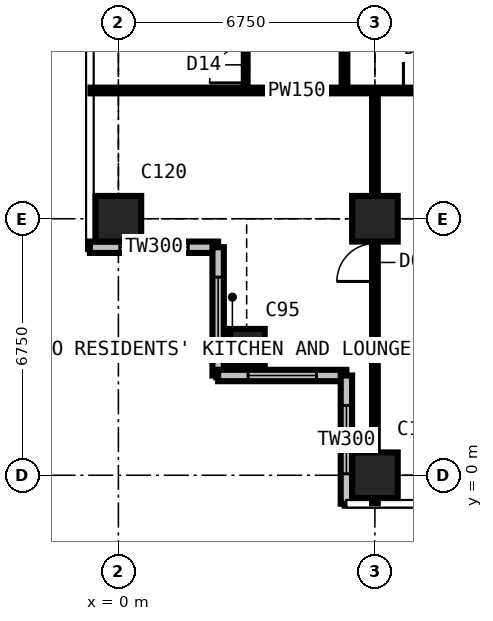
"""IFC4 building model, lengths in metres.
Left out: names, types, materials, properties, quantities, classifications, styles, units other than length and angle.
Written with IfcOpenShell. Run it as: python <this file> out.ifc"""

import sys

from ifc_helpers import new_model, si_unit, direction, frame, frame_2d, origin, origin_2d, place, context, subcontext, project, spatial, rectangle, extrude, element, fill, save


model = new_model("IFC4")
c1 = context("Model", 3, precision=1e-05, world=origin(), true_north=direction((0.0, 1.0)))
c2 = subcontext(c1, "Body", "Model", "MODEL_VIEW")
j1 = project(units=[si_unit("LENGTHUNIT", "METRE"), si_unit("PLANEANGLEUNIT", "RADIAN")], contexts=[c1])
p1 = place(None, origin())
s1 = spatial("IfcSite", under=j1, at=p1, CompositionType="ELEMENT")
p2 = place(p1, origin())
s2 = spatial("IfcBuilding", under=s1, at=p2, CompositionType="ELEMENT")
p3 = place(p2, frame((0.0, 0.0, 181.8)))
s3 = spatial("IfcBuildingStorey", under=s2, at=p3, CompositionType="ELEMENT", Elevation=181.8)
p4 = place(p3, frame((0.0, 6.75, 0.0), z_axis=(0.0, 0.0, 1.0), x_axis=(1.0, 0.0, 0.0)))
e1 = element("IfcColumn", 1, at=p4, inside=s3, PredefinedType="COLUMN", context=c2, shape_type="SweptSolid", body=[
    extrude(rectangle(XDim=1.2, YDim=1.2, at=origin_2d()), origin(), (0.0, 0.0, 1.0), 3.6),
])
p5 = place(p3, frame((3.375, 3.375, 0.0), z_axis=(0.0, 0.0, 1.0), x_axis=(1.0, 0.0, 0.0)))
e2 = element("IfcColumn", 2, at=p5, inside=s3, PredefinedType="COLUMN", context=c2, shape_type="SweptSolid", body=[
    extrude(rectangle(XDim=0.95, YDim=0.95, at=origin_2d()), origin(), (0.0, 0.0, 1.0), 3.6),
])
for number, where, z_axis, x_axis in (
    (3, (6.75, 0.0, 0.0), (0.0, 0.0, 1.0), (1.0, 0.0, 0.0)),
    (4, (6.75, 6.75, 0.0), (0.0, 0.0, 1.0), (1.0, 0.0, 0.0)),
):
    element("IfcColumn", number, at=place(p3, frame(where, z_axis=z_axis, x_axis=x_axis)), inside=s3, PredefinedType="COLUMN", context=c2, shape_type="SweptSolid", body=[
        extrude(rectangle(XDim=1.2, YDim=1.2, at=origin_2d()), origin(), (0.0, 0.0, 1.0), 3.6),
    ])
p6 = place(p3, frame((-0.75, 6.0, 0.0), z_axis=(0.0, 0.0, 1.0), x_axis=(1.0, 0.0, 0.0)))
e5 = element("IfcWall", 5, at=p6, inside=s3, PredefinedType="SOLIDWALL", context=c2, shape_type="SweptSolid", body=[
    extrude(rectangle(XDim=3.375, YDim=0.3, at=frame_2d((1.688, 0.0))), origin(), (0.0, 0.0, 1.0), 3.375),
])
p7 = place(p6, frame((0.788, 0.0, 0.6)))
e6 = element("IfcOpeningElement", 6, at=p7, cuts=e5, PredefinedType="OPENING", context=c2, shape_type="SweptSolid", body=[
    extrude(rectangle(XDim=1.8, YDim=2.1, at=frame_2d((0.9, 1.05))), frame((0.0, 0.16, 0.0), z_axis=(0.0, -1.0, 0.0), x_axis=(1.0, 0.0, 0.0)), (0.0, 0.0, 1.0), 0.32),
])
p8 = place(p3, frame((2.625, 6.0, 0.0), z_axis=(0.0, 0.0, 1.0), x_axis=(0.0, -1.0, 0.0)))
e7 = element("IfcWall", 7, at=p8, inside=s3, PredefinedType="SOLIDWALL", context=c2, shape_type="SweptSolid", body=[
    extrude(rectangle(XDim=3.375, YDim=0.3, at=frame_2d((1.688, 0.0))), origin(), (0.0, 0.0, 1.0), 3.375),
])
p9 = place(p8, frame((0.788, 0.0, 0.6)))
e8 = element("IfcOpeningElement", 8, at=p9, cuts=e7, PredefinedType="OPENING", context=c2, shape_type="SweptSolid", body=[
    extrude(rectangle(XDim=1.8, YDim=2.1, at=frame_2d((0.9, 1.05))), frame((0.0, 0.16, 0.0), z_axis=(0.0, -1.0, 0.0), x_axis=(1.0, 0.0, 0.0)), (0.0, 0.0, 1.0), 0.32),
])
p10 = place(p3, frame((2.625, 2.625, 0.0), z_axis=(0.0, 0.0, 1.0), x_axis=(1.0, 0.0, 0.0)))
e9 = element("IfcWall", 9, at=p10, inside=s3, PredefinedType="SOLIDWALL", context=c2, shape_type="SweptSolid", body=[
    extrude(rectangle(XDim=3.375, YDim=0.3, at=frame_2d((1.688, 0.0))), origin(), (0.0, 0.0, 1.0), 3.375),
])
p11 = place(p10, frame((0.788, 0.0, 0.6)))
e10 = element("IfcOpeningElement", 10, at=p11, cuts=e9, PredefinedType="OPENING", context=c2, shape_type="SweptSolid", body=[
    extrude(rectangle(XDim=1.8, YDim=2.1, at=frame_2d((0.9, 1.05))), frame((0.0, 0.16, 0.0), z_axis=(0.0, -1.0, 0.0), x_axis=(1.0, 0.0, 0.0)), (0.0, 0.0, 1.0), 0.32),
])
p12 = place(p3, frame((6.0, 2.625, 0.0), z_axis=(0.0, 0.0, 1.0), x_axis=(0.0, -1.0, 0.0)))
e11 = element("IfcWall", 11, at=p12, inside=s3, PredefinedType="SOLIDWALL", context=c2, shape_type="SweptSolid", body=[
    extrude(rectangle(XDim=3.375, YDim=0.3, at=frame_2d((1.688, 0.0))), origin(), (0.0, 0.0, 1.0), 3.375),
])
p13 = place(p12, frame((0.788, 0.0, 0.6)))
e12 = element("IfcOpeningElement", 12, at=p13, cuts=e11, PredefinedType="OPENING", context=c2, shape_type="SweptSolid", body=[
    extrude(rectangle(XDim=1.8, YDim=2.1, at=frame_2d((0.9, 1.05))), frame((0.0, 0.16, 0.0), z_axis=(0.0, -1.0, 0.0), x_axis=(1.0, 0.0, 0.0)), (0.0, 0.0, 1.0), 0.32),
])
p14 = place(p3, frame((-0.734, 10.125, 0.0), z_axis=(0.0, 0.0, 1.0), x_axis=(1.0, 0.0, 0.0)))
e13 = element("IfcWall", 13, at=p14, inside=s3, PredefinedType="PARTITIONING", context=c2, shape_type="SweptSolid", body=[
    extrude(rectangle(XDim=10.859, YDim=0.15, at=frame_2d((5.429, 0.0))), origin(), (0.0, 0.0, 1.0), 3.375),
])
p15 = place(p14, frame((8.234, 0.0, 0.0)))
e14 = element("IfcOpeningElement", 14, at=p15, cuts=e13, PredefinedType="OPENING", context=c2, shape_type="SweptSolid", body=[
    extrude(rectangle(XDim=0.95, YDim=2.2, at=frame_2d((0.475, 1.1))), frame((0.0, 0.085, 0.0), z_axis=(0.0, -1.0, 0.0), x_axis=(1.0, 0.0, 0.0)), (0.0, 0.0, 1.0), 0.17),
])
p16 = place(p3, frame((3.35, 10.125, 0.0), z_axis=(0.0, 0.0, 1.0), x_axis=(0.0, 1.0, 0.0)))
e15 = element("IfcWall", 15, at=p16, inside=s3, PredefinedType="PARTITIONING", context=c2, shape_type="SweptSolid", body=[
    extrude(rectangle(XDim=16.875, YDim=0.1, at=frame_2d((8.438, 0.0))), origin(), (0.0, 0.0, 1.0), 3.375),
])
p17 = place(p16, frame((13.7, 0.0, 0.0)))
e16 = element("IfcOpeningElement", 16, at=p17, cuts=e15, PredefinedType="OPENING", context=c2, shape_type="SweptSolid", body=[
    extrude(rectangle(XDim=0.95, YDim=2.2, at=frame_2d((0.475, 1.1))), frame((0.0, 0.06, 0.0), z_axis=(0.0, -1.0, 0.0), x_axis=(1.0, 0.0, 0.0)), (0.0, 0.0, 1.0), 0.12),
])
p18 = place(p16, frame((0.2, 0.0, 0.0)))
e17 = element("IfcOpeningElement", 17, at=p18, cuts=e15, PredefinedType="OPENING", context=c2, shape_type="SweptSolid", body=[
    extrude(rectangle(XDim=0.95, YDim=2.2, at=frame_2d((0.475, 1.1))), frame((0.0, 0.06, 0.0), z_axis=(0.0, -1.0, 0.0), x_axis=(1.0, 0.0, 0.0)), (0.0, 0.0, 1.0), 0.12),
])
p19 = place(p16, frame((3.575, 0.0, 0.0)))
e18 = element("IfcOpeningElement", 18, at=p19, cuts=e15, PredefinedType="OPENING", context=c2, shape_type="SweptSolid", body=[
    extrude(rectangle(XDim=0.95, YDim=2.2, at=frame_2d((0.475, 1.1))), frame((0.0, 0.06, 0.0), z_axis=(0.0, -1.0, 0.0), x_axis=(1.0, 0.0, 0.0)), (0.0, 0.0, 1.0), 0.12),
])
p20 = place(p16, frame((6.95, 0.0, 0.0)))
e19 = element("IfcOpeningElement", 19, at=p20, cuts=e15, PredefinedType="OPENING", context=c2, shape_type="SweptSolid", body=[
    extrude(rectangle(XDim=0.95, YDim=2.2, at=frame_2d((0.475, 1.1))), frame((0.0, 0.06, 0.0), z_axis=(0.0, -1.0, 0.0), x_axis=(1.0, 0.0, 0.0)), (0.0, 0.0, 1.0), 0.12),
])
p21 = place(p16, frame((10.325, 0.0, 0.0)))
e20 = element("IfcOpeningElement", 20, at=p21, cuts=e15, PredefinedType="OPENING", context=c2, shape_type="SweptSolid", body=[
    extrude(rectangle(XDim=0.95, YDim=2.2, at=frame_2d((0.475, 1.1))), frame((0.0, 0.06, 0.0), z_axis=(0.0, -1.0, 0.0), x_axis=(1.0, 0.0, 0.0)), (0.0, 0.0, 1.0), 0.12),
])
p22 = place(p3, frame((5.95, 10.125, 0.0), z_axis=(0.0, 0.0, 1.0), x_axis=(0.0, 1.0, 0.0)))
e21 = element("IfcWall", 21, at=p22, inside=s3, PredefinedType="PARTITIONING", context=c2, shape_type="SweptSolid", body=[
    extrude(rectangle(XDim=2.65, YDim=0.15, at=frame_2d((1.325, 0.0))), origin(), (0.0, 0.0, 1.0), 3.375),
])
p23 = place(p3, frame((6.75, -0.734, 0.0), z_axis=(0.0, 0.0, 1.0), x_axis=(0.0, 1.0, 0.0)))
e22 = element("IfcWall", 22, at=p23, inside=s3, PredefinedType="PARTITIONING", context=c2, shape_type="SweptSolid", body=[
    extrude(rectangle(XDim=10.859, YDim=0.15, at=frame_2d((5.429, 0.0))), origin(), (0.0, 0.0, 1.0), 2.877),
])
p24 = place(p23, frame((5.834, 0.0, 0.0)))
e23 = element("IfcOpeningElement", 23, at=p24, cuts=e22, PredefinedType="OPENING", context=c2, shape_type="SweptSolid", body=[
    extrude(rectangle(XDim=1.0, YDim=2.2, at=frame_2d((0.5, 1.1))), frame((0.0, 0.085, 0.0), z_axis=(0.0, -1.0, 0.0), x_axis=(1.0, 0.0, 0.0)), (0.0, 0.0, 1.0), 0.17),
])
p25 = place(p3, frame((6.75, 3.35, 0.0), z_axis=(0.0, 0.0, 1.0), x_axis=(1.0, 0.0, 0.0)))
e24 = element("IfcWall", 24, at=p25, inside=s3, PredefinedType="PARTITIONING", context=c2, shape_type="SweptSolid", body=[
    extrude(rectangle(XDim=20.25, YDim=0.15, at=frame_2d((10.125, 0.0))), origin(), (0.0, 0.0, 1.0), 3.375),
])
p26 = place(p25, frame((15.1, 0.0, 0.0)))
e25 = element("IfcOpeningElement", 25, at=p26, cuts=e24, PredefinedType="OPENING", context=c2, shape_type="SweptSolid", body=[
    extrude(rectangle(XDim=0.95, YDim=2.2, at=frame_2d((0.475, 1.1))), frame((0.0, 0.085, 0.0), z_axis=(0.0, -1.0, 0.0), x_axis=(1.0, 0.0, 0.0)), (0.0, 0.0, 1.0), 0.17),
])
p27 = place(p25, frame((8.35, 0.0, 0.0)))
e26 = element("IfcOpeningElement", 26, at=p27, cuts=e24, PredefinedType="OPENING", context=c2, shape_type="SweptSolid", body=[
    extrude(rectangle(XDim=0.95, YDim=2.2, at=frame_2d((0.475, 1.1))), frame((0.0, 0.085, 0.0), z_axis=(0.0, -1.0, 0.0), x_axis=(1.0, 0.0, 0.0)), (0.0, 0.0, 1.0), 0.17),
])
p28 = place(p25, frame((1.6, 0.0, 0.0)))
e27 = element("IfcOpeningElement", 27, at=p28, cuts=e24, PredefinedType="OPENING", context=c2, shape_type="SweptSolid", body=[
    extrude(rectangle(XDim=0.95, YDim=2.2, at=frame_2d((0.475, 1.1))), frame((0.0, 0.085, 0.0), z_axis=(0.0, -1.0, 0.0), x_axis=(1.0, 0.0, 0.0)), (0.0, 0.0, 1.0), 0.17),
])
p29 = place(p7, origin())
e28 = element("IfcWindow", 28, at=p29, inside=s3, PartitioningType="SINGLE_PANEL", PredefinedType="WINDOW", context=c2, shape_type="SweptSolid", body=[
    extrude(rectangle(XDim=1.8, YDim=2.1, at=frame_2d((0.9, 1.05))), frame((0.0, 0.03, 0.0), z_axis=(0.0, -1.0, 0.0), x_axis=(1.0, 0.0, 0.0)), (0.0, 0.0, 1.0), 0.06),
])
fill(e6, e28)
p30 = place(p9, origin())
e29 = element("IfcWindow", 29, at=p30, inside=s3, PartitioningType="SINGLE_PANEL", PredefinedType="WINDOW", context=c2, shape_type="SweptSolid", body=[
    extrude(rectangle(XDim=1.8, YDim=2.1, at=frame_2d((0.9, 1.05))), frame((0.0, 0.03, 0.0), z_axis=(0.0, -1.0, 0.0), x_axis=(1.0, 0.0, 0.0)), (0.0, 0.0, 1.0), 0.06),
])
fill(e8, e29)
p31 = place(p11, origin())
e30 = element("IfcWindow", 30, at=p31, inside=s3, PartitioningType="SINGLE_PANEL", PredefinedType="WINDOW", context=c2, shape_type="SweptSolid", body=[
    extrude(rectangle(XDim=1.8, YDim=2.1, at=frame_2d((0.9, 1.05))), frame((0.0, 0.03, 0.0), z_axis=(0.0, -1.0, 0.0), x_axis=(1.0, 0.0, 0.0)), (0.0, 0.0, 1.0), 0.06),
])
fill(e10, e30)
p32 = place(p13, origin())
e31 = element("IfcWindow", 31, at=p32, inside=s3, PartitioningType="SINGLE_PANEL", PredefinedType="WINDOW", context=c2, shape_type="SweptSolid", body=[
    extrude(rectangle(XDim=1.8, YDim=2.1, at=frame_2d((0.9, 1.05))), frame((0.0, 0.03, 0.0), z_axis=(0.0, -1.0, 0.0), x_axis=(1.0, 0.0, 0.0)), (0.0, 0.0, 1.0), 0.06),
])
fill(e12, e31)
p33 = place(p24, origin())
e32 = element("IfcDoor", 32, at=p33, inside=s3, OperationType="SINGLE_SWING_LEFT", PredefinedType="DOOR", context=c2, shape_type="SweptSolid", body=[
    extrude(rectangle(XDim=1.0, YDim=2.2, at=frame_2d((0.5, 1.1))), frame((0.0, 0.025, 0.0), z_axis=(0.0, -1.0, 0.0), x_axis=(1.0, 0.0, 0.0)), (0.0, 0.0, 1.0), 0.05),
])
fill(e23, e32)
p34 = place(p18, origin())
e33 = element("IfcDoor", 33, at=p34, inside=s3, OperationType="SINGLE_SWING_LEFT", PredefinedType="DOOR", context=c2, shape_type="SweptSolid", body=[
    extrude(rectangle(XDim=0.95, YDim=2.2, at=frame_2d((0.475, 1.1))), frame((0.0, 0.025, 0.0), z_axis=(0.0, -1.0, 0.0), x_axis=(1.0, 0.0, 0.0)), (0.0, 0.0, 1.0), 0.05),
])
fill(e17, e33)
p35 = place(p15, origin())
e34 = element("IfcDoor", 34, at=p35, inside=s3, OperationType="SINGLE_SWING_LEFT", PredefinedType="DOOR", context=c2, shape_type="SweptSolid", body=[
    extrude(rectangle(XDim=0.95, YDim=2.2, at=frame_2d((0.475, 1.1))), frame((0.0, 0.025, 0.0), z_axis=(0.0, -1.0, 0.0), x_axis=(1.0, 0.0, 0.0)), (0.0, 0.0, 1.0), 0.05),
])
fill(e14, e34)
save(model, sys.argv[1])
